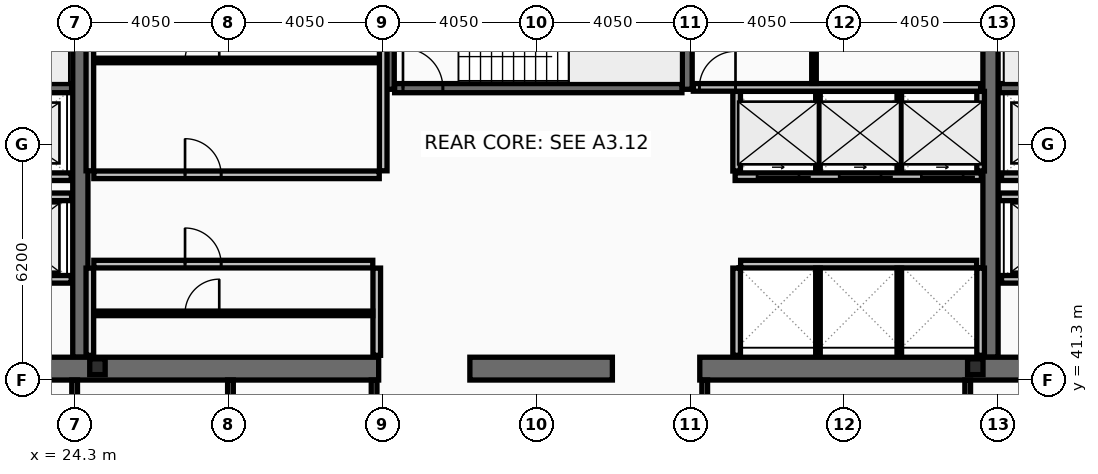
"""IFC4 building model, lengths in metres.
Left out: names, types, materials, properties, quantities, classifications, styles, units other than length and angle.
Written with IfcOpenShell. Run it as: python <this file> out.ifc"""

import sys

from ifc_helpers import new_model, si_unit, direction, frame, frame_2d, origin, origin_2d, place, context, subcontext, project, spatial, rectangle, i_section, extrude, element, fill, save


model = new_model("IFC4")
c1 = context("Model", 3, precision=1e-05, world=origin(), true_north=direction((0.0, 1.0)))
c2 = subcontext(c1, "Body", "Model", "MODEL_VIEW")
j1 = project(units=[si_unit("LENGTHUNIT", "METRE"), si_unit("PLANEANGLEUNIT", "RADIAN")], contexts=[c1])
p1 = place(None, origin())
s1 = spatial("IfcSite", under=j1, at=p1, CompositionType="ELEMENT")
p2 = place(p1, origin())
s2 = spatial("IfcBuilding", under=s1, at=p2, CompositionType="ELEMENT")
p3 = place(p2, frame((0.0, 0.0, 224.6)))
s3 = spatial("IfcBuildingStorey", under=s2, at=p3, CompositionType="ELEMENT", Elevation=224.6)
for number, where, z_axis, x_axis in (
    (1, (24.45, 41.9, 0.0), (0.0, 0.0, 1.0), (0.0, 1.0, 0.0)),
    (2, (48.4, 41.9, 0.0), (0.0, 0.0, 1.0), (0.0, 1.0, 0.0)),
):
    element("IfcWall", number, at=place(p3, frame(where, z_axis=z_axis, x_axis=x_axis)), inside=s3, PredefinedType="SHEAR", context=c2, shape_type="SweptSolid", body=[
        extrude(rectangle(XDim=11.2, YDim=0.4, at=frame_2d((5.6, 0.0))), origin(), (0.0, 0.0, 1.0), 3.44),
    ])
p4 = place(p3, frame((32.3, 41.6, 0.0), z_axis=(0.0, 0.0, 1.0), x_axis=(-1.0, 0.0, 0.0)))
e3 = element("IfcWall", 3, at=p4, inside=s3, PredefinedType="SHEAR", context=c2, shape_type="SweptSolid", body=[
    extrude(rectangle(XDim=11.45, YDim=0.6, at=frame_2d((5.725, 0.0))), origin(), (0.0, 0.0, 1.0), 3.44),
])
p5 = place(p3, frame((38.45, 41.6, 0.0), z_axis=(0.0, 0.0, 1.0), x_axis=(-1.0, 0.0, 0.0)))
e4 = element("IfcWall", 4, at=p5, inside=s3, PredefinedType="SHEAR", context=c2, shape_type="SweptSolid", body=[
    extrude(rectangle(XDim=3.75, YDim=0.6, at=frame_2d((1.875, 0.0))), origin(), (0.0, 0.0, 1.0), 3.44),
])
p6 = place(p3, frame((52.05, 41.6, 0.0), z_axis=(0.0, 0.0, 1.0), x_axis=(-1.0, 0.0, 0.0)))
e5 = element("IfcWall", 5, at=p6, inside=s3, PredefinedType="SHEAR", context=c2, shape_type="SweptSolid", body=[
    extrude(rectangle(XDim=11.3, YDim=0.6, at=frame_2d((5.65, 0.0))), origin(), (0.0, 0.0, 1.0), 3.44),
])
for number, where, z_axis, x_axis in (
    (6, (32.58, 48.95, 0.0), (0.0, 0.0, 1.0), (0.0, 1.0, 0.0)),
    (7, (40.42, 48.95, 0.0), (0.0, 0.0, 1.0), (0.0, 1.0, 0.0)),
):
    element("IfcWall", number, at=place(p3, frame(where, z_axis=z_axis, x_axis=x_axis)), inside=s3, PredefinedType="SHEAR", context=c2, shape_type="SweptSolid", body=[
        extrude(rectangle(XDim=4.15, YDim=0.26, at=frame_2d((2.075, 0.0))), origin(), (0.0, 0.0, 1.0), 3.44),
    ])
p7 = place(p3, frame((16.8, 48.98, 0.0), z_axis=(0.0, 0.0, 1.0), x_axis=(1.0, 0.0, 0.0)))
e8 = element("IfcWall", 8, at=p7, inside=s3, PredefinedType="SHEAR", context=c2, shape_type="SweptSolid", body=[
    extrude(rectangle(XDim=7.42, YDim=0.24, at=frame_2d((3.71, 0.0))), origin(), (0.0, 0.0, 1.0), 3.44),
])
p8 = place(p7, frame((0.22, 0.0, 0.0)))
e9 = element("IfcOpeningElement", 9, at=p8, cuts=e8, PredefinedType="OPENING", context=c2, shape_type="SweptSolid", body=[
    extrude(rectangle(XDim=1.05, YDim=2.15, at=frame_2d((0.525, 1.075))), frame((0.0, 0.13, 0.0), z_axis=(0.0, -1.0, 0.0), x_axis=(1.0, 0.0, 0.0)), (0.0, 0.0, 1.0), 0.26),
])
p9 = place(p3, frame((48.63, 48.98, 0.0), z_axis=(0.0, 0.0, 1.0), x_axis=(1.0, 0.0, 0.0)))
e10 = element("IfcWall", 10, at=p9, inside=s3, PredefinedType="SHEAR", context=c2, shape_type="SweptSolid", body=[
    extrude(rectangle(XDim=7.47, YDim=0.24, at=frame_2d((3.735, 0.0))), origin(), (0.0, 0.0, 1.0), 3.44),
])
p10 = place(p9, frame((6.2, 0.0, 0.0)))
e11 = element("IfcOpeningElement", 11, at=p10, cuts=e10, PredefinedType="OPENING", context=c2, shape_type="SweptSolid", body=[
    extrude(rectangle(XDim=1.05, YDim=2.15, at=frame_2d((0.525, 1.075))), frame((0.0, 0.13, 0.0), z_axis=(0.0, -1.0, 0.0), x_axis=(1.0, 0.0, 0.0)), (0.0, 0.0, 1.0), 0.26),
])
p11 = place(p3, frame((32.72, 48.98, 0.0), z_axis=(0.0, 0.0, 1.0), x_axis=(1.0, 0.0, 0.0)))
e12 = element("IfcWall", 12, at=p11, inside=s3, PredefinedType="SHEAR", context=c2, shape_type="SweptSolid", body=[
    extrude(rectangle(XDim=7.56, YDim=0.24, at=frame_2d((3.78, 0.0))), origin(), (0.0, 0.0, 1.0), 3.44),
])
p12 = place(p11, frame((0.22, 0.0, 0.0)))
e13 = element("IfcOpeningElement", 13, at=p12, cuts=e12, PredefinedType="OPENING", context=c2, shape_type="SweptSolid", body=[
    extrude(rectangle(XDim=1.05, YDim=2.15, at=frame_2d((0.525, 1.075))), frame((0.0, 0.13, 0.0), z_axis=(0.0, -1.0, 0.0), x_axis=(1.0, 0.0, 0.0)), (0.0, 0.0, 1.0), 0.26),
])
for number, where, z_axis, x_axis in (
    (14, (24.9, 41.65, 0.0), (0.0, 0.0, 1.0), (1.0, 0.0, 0.0)),
    (15, (48.0, 41.65, 0.0), (0.0, 0.0, 1.0), (1.0, 0.0, 0.0)),
):
    element("IfcColumn", number, at=place(p3, frame(where, z_axis=z_axis, x_axis=x_axis)), inside=s3, PredefinedType="COLUMN", context=c2, shape_type="SweptSolid", body=[
        extrude(i_section(OverallWidth=0.406, OverallDepth=0.416, WebThickness=0.03, FlangeThickness=0.048, at=origin_2d()), origin(), (0.0, 0.0, 1.0), 3.6),
    ])
p13 = place(p3, frame((51.61, 43.95, 0.0), z_axis=(0.0, 0.0, 1.0), x_axis=(-1.0, 0.0, 0.0)))
e16 = element("IfcWall", 16, at=p13, inside=s3, PredefinedType="PARTITIONING", context=c2, shape_type="SweptSolid", body=[
    extrude(rectangle(XDim=2.92, YDim=0.2, at=frame_2d((1.46, 0.0))), origin(), (0.0, 0.0, 1.0), 3.44),
])
p14 = place(p13, frame((0.81, 0.0, 0.0)))
e17 = element("IfcOpeningElement", 17, at=p14, cuts=e16, PredefinedType="OPENING", context=c2, shape_type="SweptSolid", body=[
    extrude(rectangle(XDim=1.3, YDim=2.18, at=frame_2d((0.65, 1.09))), frame((0.0, 0.11, 0.0), z_axis=(0.0, -1.0, 0.0), x_axis=(1.0, 0.0, 0.0)), (0.0, 0.0, 1.0), 0.22),
])
p15 = place(p3, frame((24.21, 43.95, 0.0), z_axis=(0.0, 0.0, 1.0), x_axis=(-1.0, 0.0, 0.0)))
e18 = element("IfcWall", 18, at=p15, inside=s3, PredefinedType="PARTITIONING", context=c2, shape_type="SweptSolid", body=[
    extrude(rectangle(XDim=2.97, YDim=0.2, at=frame_2d((1.485, 0.0))), origin(), (0.0, 0.0, 1.0), 3.44),
])
p16 = place(p15, frame((0.86, 0.0, 0.0)))
e19 = element("IfcOpeningElement", 19, at=p16, cuts=e18, PredefinedType="OPENING", context=c2, shape_type="SweptSolid", body=[
    extrude(rectangle(XDim=1.3, YDim=2.18, at=frame_2d((0.65, 1.09))), frame((0.0, 0.11, 0.0), z_axis=(0.0, -1.0, 0.0), x_axis=(1.0, 0.0, 0.0)), (0.0, 0.0, 1.0), 0.22),
])
p17 = place(p3, frame((51.61, 46.65, 0.0), z_axis=(0.0, 0.0, 1.0), x_axis=(-1.0, 0.0, 0.0)))
e20 = element("IfcWall", 20, at=p17, inside=s3, PredefinedType="PARTITIONING", context=c2, shape_type="SweptSolid", body=[
    extrude(rectangle(XDim=2.92, YDim=0.2, at=frame_2d((1.46, 0.0))), origin(), (0.0, 0.0, 1.0), 3.44),
])
p18 = place(p17, frame((0.86, 0.0, 0.0)))
e21 = element("IfcOpeningElement", 21, at=p18, cuts=e20, PredefinedType="OPENING", context=c2, shape_type="SweptSolid", body=[
    extrude(rectangle(XDim=1.2, YDim=2.18, at=frame_2d((0.6, 1.09))), frame((0.0, 0.11, 0.0), z_axis=(0.0, -1.0, 0.0), x_axis=(1.0, 0.0, 0.0)), (0.0, 0.0, 1.0), 0.22),
])
p19 = place(p3, frame((24.21, 46.65, 0.0), z_axis=(0.0, 0.0, 1.0), x_axis=(-1.0, 0.0, 0.0)))
e22 = element("IfcWall", 22, at=p19, inside=s3, PredefinedType="PARTITIONING", context=c2, shape_type="SweptSolid", body=[
    extrude(rectangle(XDim=2.97, YDim=0.2, at=frame_2d((1.485, 0.0))), origin(), (0.0, 0.0, 1.0), 3.44),
])
p20 = place(p19, frame((0.91, 0.0, 0.0)))
e23 = element("IfcOpeningElement", 23, at=p20, cuts=e22, PredefinedType="OPENING", context=c2, shape_type="SweptSolid", body=[
    extrude(rectangle(XDim=1.2, YDim=2.18, at=frame_2d((0.6, 1.09))), frame((0.0, 0.11, 0.0), z_axis=(0.0, -1.0, 0.0), x_axis=(1.0, 0.0, 0.0)), (0.0, 0.0, 1.0), 0.22),
])
p21 = place(p3, frame((48.16, 46.65, 0.0), z_axis=(0.0, 0.0, 1.0), x_axis=(-1.0, 0.0, 0.0)))
e24 = element("IfcWall", 24, at=p21, inside=s3, PredefinedType="PARTITIONING", context=c2, shape_type="SweptSolid", body=[
    extrude(rectangle(XDim=6.48, YDim=0.2, at=frame_2d((3.24, 0.0))), origin(), (0.0, 0.0, 1.0), 3.44),
])
p22 = place(p21, frame((4.8, 0.0, 0.0)))
e25 = element("IfcOpeningElement", 25, at=p22, cuts=e24, PredefinedType="OPENING", context=c2, shape_type="SweptSolid", body=[
    extrude(rectangle(XDim=1.1, YDim=2.18, at=frame_2d((0.55, 1.09))), frame((0.0, 0.11, 0.0), z_axis=(0.0, -1.0, 0.0), x_axis=(1.0, 0.0, 0.0)), (0.0, 0.0, 1.0), 0.22),
])
p23 = place(p21, frame((2.64, 0.0, 0.0)))
e26 = element("IfcOpeningElement", 26, at=p23, cuts=e24, PredefinedType="OPENING", context=c2, shape_type="SweptSolid", body=[
    extrude(rectangle(XDim=1.1, YDim=2.18, at=frame_2d((0.55, 1.09))), frame((0.0, 0.11, 0.0), z_axis=(0.0, -1.0, 0.0), x_axis=(1.0, 0.0, 0.0)), (0.0, 0.0, 1.0), 0.22),
])
p24 = place(p21, frame((0.48, 0.0, 0.0)))
e27 = element("IfcOpeningElement", 27, at=p24, cuts=e24, PredefinedType="OPENING", context=c2, shape_type="SweptSolid", body=[
    extrude(rectangle(XDim=1.1, YDim=2.18, at=frame_2d((0.55, 1.09))), frame((0.0, 0.11, 0.0), z_axis=(0.0, -1.0, 0.0), x_axis=(1.0, 0.0, 0.0)), (0.0, 0.0, 1.0), 0.22),
])
p25 = place(p3, frame((21.2, 46.12, 0.0), z_axis=(0.0, 0.0, 1.0), x_axis=(1.0, 0.0, 0.0)))
e28 = element("IfcWall", 28, at=p25, inside=s3, PredefinedType="PARTITIONING", context=c2, shape_type="SweptSolid", body=[
    extrude(rectangle(XDim=3.02, YDim=0.2, at=frame_2d((1.51, 0.0))), origin(), (0.0, 0.0, 1.0), 3.44),
])
p26 = place(p3, frame((48.63, 46.12, 0.0), z_axis=(0.0, 0.0, 1.0), x_axis=(1.0, 0.0, 0.0)))
e29 = element("IfcWall", 29, at=p26, inside=s3, PredefinedType="PARTITIONING", context=c2, shape_type="SweptSolid", body=[
    extrude(rectangle(XDim=3.07, YDim=0.2, at=frame_2d((1.535, 0.0))), origin(), (0.0, 0.0, 1.0), 3.44),
])
for number, where, z_axis, x_axis in (
    (30, (24.7, 46.805, 0.0), (0.0, 0.0, 1.0), (0.0, 1.0, 0.0)),
    (31, (32.42, 46.805, 0.0), (0.0, 0.0, 1.0), (0.0, 1.0, 0.0)),
):
    element("IfcWall", number, at=place(p3, frame(where, z_axis=z_axis, x_axis=x_axis)), inside=s3, PredefinedType="PARTITIONING", context=c2, shape_type="SweptSolid", body=[
        extrude(rectangle(XDim=5.99, YDim=0.2, at=frame_2d((2.995, 0.0))), origin(), (0.0, 0.0, 1.0), 3.44),
    ])
p27 = place(p3, frame((24.805, 49.709, 0.0), z_axis=(0.0, 0.0, 1.0), x_axis=(1.0, 0.0, 0.0)))
e32 = element("IfcWall", 32, at=p27, inside=s3, PredefinedType="PARTITIONING", context=c2, shape_type="SweptSolid", body=[
    extrude(rectangle(XDim=7.51, YDim=0.12, at=frame_2d((3.755, 0.0))), origin(), (0.0, 0.0, 1.0), 3.44),
])
p28 = place(p27, frame((2.4, 0.0, 0.0)))
e33 = element("IfcOpeningElement", 33, at=p28, cuts=e32, PredefinedType="OPENING", context=c2, shape_type="SweptSolid", body=[
    extrude(rectangle(XDim=0.9, YDim=2.05, at=frame_2d((0.45, 1.025))), frame((0.0, 0.07, 0.0), z_axis=(0.0, -1.0, 0.0), x_axis=(1.0, 0.0, 0.0)), (0.0, 0.0, 1.0), 0.14),
])
p29 = place(p3, frame((24.805, 46.7, 0.0), z_axis=(0.0, 0.0, 1.0), x_axis=(1.0, 0.0, 0.0)))
e34 = element("IfcWall", 34, at=p29, inside=s3, PredefinedType="PARTITIONING", context=c2, shape_type="SweptSolid", body=[
    extrude(rectangle(XDim=7.51, YDim=0.2, at=frame_2d((3.755, 0.0))), origin(), (0.0, 0.0, 1.0), 3.44),
])
p30 = place(p29, frame((2.4, 0.0, 0.0)))
e35 = element("IfcOpeningElement", 35, at=p30, cuts=e34, PredefinedType="OPENING", context=c2, shape_type="SweptSolid", body=[
    extrude(rectangle(XDim=0.95, YDim=2.1, at=frame_2d((0.475, 1.05))), frame((0.0, 0.11, 0.0), z_axis=(0.0, -1.0, 0.0), x_axis=(1.0, 0.0, 0.0)), (0.0, 0.0, 1.0), 0.22),
])
for number, where, z_axis, x_axis in (
    (36, (24.7, 41.95, 0.0), (0.0, 0.0, 1.0), (0.0, 1.0, 0.0)),
    (37, (32.25, 41.95, 0.0), (0.0, 0.0, 1.0), (0.0, 1.0, 0.0)),
):
    element("IfcWall", number, at=place(p3, frame(where, z_axis=z_axis, x_axis=x_axis)), inside=s3, PredefinedType="PARTITIONING", context=c2, shape_type="SweptSolid", body=[
        extrude(rectangle(XDim=2.295, YDim=0.2, at=frame_2d((1.147, 0.0))), origin(), (0.0, 0.0, 1.0), 3.44),
    ])
p31 = place(p3, frame((24.805, 43.054, 0.0), z_axis=(0.0, 0.0, 1.0), x_axis=(1.0, 0.0, 0.0)))
e38 = element("IfcWall", 38, at=p31, inside=s3, PredefinedType="PARTITIONING", context=c2, shape_type="SweptSolid", body=[
    extrude(rectangle(XDim=7.34, YDim=0.12, at=frame_2d((3.67, 0.0))), origin(), (0.0, 0.0, 1.0), 3.44),
])
p32 = place(p31, frame((2.4, 0.0, 0.0)))
e39 = element("IfcOpeningElement", 39, at=p32, cuts=e38, PredefinedType="OPENING", context=c2, shape_type="SweptSolid", body=[
    extrude(rectangle(XDim=0.9, YDim=2.05, at=frame_2d((0.45, 1.025))), frame((0.0, 0.07, 0.0), z_axis=(0.0, -1.0, 0.0), x_axis=(1.0, 0.0, 0.0)), (0.0, 0.0, 1.0), 0.14),
])
p33 = place(p3, frame((24.805, 44.35, 0.0), z_axis=(0.0, 0.0, 1.0), x_axis=(1.0, 0.0, 0.0)))
e40 = element("IfcWall", 40, at=p33, inside=s3, PredefinedType="PARTITIONING", context=c2, shape_type="SweptSolid", body=[
    extrude(rectangle(XDim=7.34, YDim=0.2, at=frame_2d((3.67, 0.0))), origin(), (0.0, 0.0, 1.0), 3.44),
])
p34 = place(p33, frame((2.4, 0.0, 0.0)))
e41 = element("IfcOpeningElement", 41, at=p34, cuts=e40, PredefinedType="OPENING", context=c2, shape_type="SweptSolid", body=[
    extrude(rectangle(XDim=0.95, YDim=2.1, at=frame_2d((0.475, 1.05))), frame((0.0, 0.11, 0.0), z_axis=(0.0, -1.0, 0.0), x_axis=(1.0, 0.0, 0.0)), (0.0, 0.0, 1.0), 0.22),
])
for number, where, z_axis, x_axis in (
    (42, (41.72, 46.8, 0.0), (0.0, 0.0, 1.0), (0.0, 1.0, 0.0)),
    (43, (48.14, 46.8, 0.0), (0.0, 0.0, 1.0), (0.0, 1.0, 0.0)),
):
    element("IfcWall", number, at=place(p3, frame(where, z_axis=z_axis, x_axis=x_axis)), inside=s3, PredefinedType="PARTITIONING", context=c2, shape_type="SweptSolid", body=[
        extrude(rectangle(XDim=2.095, YDim=0.2, at=frame_2d((1.047, 0.0))), origin(), (0.0, 0.0, 1.0), 3.44),
    ])
for number, where, z_axis, x_axis in (
    (44, (43.86, 46.8, 0.0), (0.0, 0.0, 1.0), (0.0, 1.0, 0.0)),
    (45, (46.0, 46.8, 0.0), (0.0, 0.0, 1.0), (0.0, 1.0, 0.0)),
):
    element("IfcWall", number, at=place(p3, frame(where, z_axis=z_axis, x_axis=x_axis)), inside=s3, PredefinedType="PARTITIONING", context=c2, shape_type="SweptSolid", body=[
        extrude(rectangle(XDim=2.095, YDim=0.12, at=frame_2d((1.047, 0.0))), origin(), (0.0, 0.0, 1.0), 3.44),
    ])
p35 = place(p3, frame((41.825, 44.35, 0.0), z_axis=(0.0, 0.0, 1.0), x_axis=(1.0, 0.0, 0.0)))
e46 = element("IfcWall", 46, at=p35, inside=s3, PredefinedType="PARTITIONING", context=c2, shape_type="SweptSolid", body=[
    extrude(rectangle(XDim=6.21, YDim=0.2, at=frame_2d((3.105, 0.0))), origin(), (0.0, 0.0, 1.0), 3.44),
])
for number, where, z_axis, x_axis in (
    (47, (41.72, 41.95, 0.0), (0.0, 0.0, 1.0), (0.0, 1.0, 0.0)),
    (48, (48.14, 41.95, 0.0), (0.0, 0.0, 1.0), (0.0, 1.0, 0.0)),
):
    element("IfcWall", number, at=place(p3, frame(where, z_axis=z_axis, x_axis=x_axis)), inside=s3, PredefinedType="PARTITIONING", context=c2, shape_type="SweptSolid", body=[
        extrude(rectangle(XDim=2.295, YDim=0.2, at=frame_2d((1.147, 0.0))), origin(), (0.0, 0.0, 1.0), 3.44),
    ])
for number, where, z_axis, x_axis in (
    (49, (43.86, 41.95, 0.0), (0.0, 0.0, 1.0), (0.0, 1.0, 0.0)),
    (50, (46.0, 41.95, 0.0), (0.0, 0.0, 1.0), (0.0, 1.0, 0.0)),
):
    element("IfcWall", number, at=place(p3, frame(where, z_axis=z_axis, x_axis=x_axis)), inside=s3, PredefinedType="PARTITIONING", context=c2, shape_type="SweptSolid", body=[
        extrude(rectangle(XDim=2.295, YDim=0.12, at=frame_2d((1.147, 0.0))), origin(), (0.0, 0.0, 1.0), 3.44),
    ])
p36 = place(p3, frame((40.58, 49.0, 0.0), z_axis=(0.0, 0.0, 1.0), x_axis=(1.0, 0.0, 0.0)))
e51 = element("IfcWall", 51, at=p36, inside=s3, PredefinedType="PARTITIONING", context=c2, shape_type="SweptSolid", body=[
    extrude(rectangle(XDim=7.56, YDim=0.2, at=frame_2d((3.78, 0.0))), origin(), (0.0, 0.0, 1.0), 3.44),
])
p37 = place(p36, frame((0.16, 0.0, 0.0)))
e52 = element("IfcOpeningElement", 52, at=p37, cuts=e51, PredefinedType="OPENING", context=c2, shape_type="SweptSolid", body=[
    extrude(rectangle(XDim=0.95, YDim=2.1, at=frame_2d((0.475, 1.05))), frame((0.0, 0.11, 0.0), z_axis=(0.0, -1.0, 0.0), x_axis=(1.0, 0.0, 0.0)), (0.0, 0.0, 1.0), 0.22),
])
p38 = place(p3, frame((43.755, 49.105, 0.0), z_axis=(0.0, 0.0, 1.0), x_axis=(0.0, 1.0, 0.0)))
e53 = element("IfcWall", 53, at=p38, inside=s3, PredefinedType="PARTITIONING", context=c2, shape_type="SweptSolid", body=[
    extrude(rectangle(XDim=3.69, YDim=0.12, at=frame_2d((1.845, 0.0))), origin(), (0.0, 0.0, 1.0), 3.44),
])
p39 = place(p38, frame((1.05, 0.0, 0.0)))
e54 = element("IfcOpeningElement", 54, at=p39, cuts=e53, PredefinedType="OPENING", context=c2, shape_type="SweptSolid", body=[
    extrude(rectangle(XDim=0.9, YDim=2.05, at=frame_2d((0.45, 1.025))), frame((0.0, 0.07, 0.0), z_axis=(0.0, -1.0, 0.0), x_axis=(1.0, 0.0, 0.0)), (0.0, 0.0, 1.0), 0.14),
])
for number, where, z_axis, x_axis in (
    (55, (24.3, 38.28, 0.0), (0.0, 0.0, 1.0), (0.0, 1.0, 0.0)),
    (56, (28.4, 38.28, 0.0), (0.0, 0.0, 1.0), (0.0, 1.0, 0.0)),
    (57, (32.18, 38.28, 0.0), (0.0, 0.0, 1.0), (0.0, 1.0, 0.0)),
    (58, (40.88, 38.28, 0.0), (0.0, 0.0, 1.0), (0.0, 1.0, 0.0)),
):
    element("IfcWall", number, at=place(p3, frame(where, z_axis=z_axis, x_axis=x_axis)), inside=s3, PredefinedType="PARTITIONING", context=c2, shape_type="SweptSolid", body=[
        extrude(rectangle(XDim=3.02, YDim=0.15, at=frame_2d((1.51, 0.0))), origin(), (0.0, 0.0, 1.0), 3.44),
    ])
p40 = place(p3, frame((47.8, 38.28, 0.0), z_axis=(0.0, 0.0, 1.0), x_axis=(0.0, 1.0, 0.0)))
e59 = element("IfcWall", 59, at=p40, inside=s3, PredefinedType="PARTITIONING", context=c2, shape_type="SweptSolid", body=[
    extrude(rectangle(XDim=3.02, YDim=0.15, at=frame_2d((1.51, 0.0))), origin(), (0.0, 0.0, 1.0), 2.78),
])
p41 = place(p12, origin())
e60 = element("IfcDoor", 60, at=p41, inside=s3, OperationType="SINGLE_SWING_LEFT", PredefinedType="DOOR", context=c2, shape_type="SweptSolid", body=[
    extrude(rectangle(XDim=1.05, YDim=2.15, at=frame_2d((0.525, 1.075))), frame((0.0, 0.025, 0.0), z_axis=(0.0, -1.0, 0.0), x_axis=(1.0, 0.0, 0.0)), (0.0, 0.0, 1.0), 0.05),
])
fill(e13, e60)
p42 = place(p22, origin())
e61 = element("IfcDoor", 61, at=p42, inside=s3, OperationType="SLIDING_TO_LEFT", PredefinedType="DOOR", context=c2, shape_type="SweptSolid", body=[
    extrude(rectangle(XDim=1.1, YDim=2.18, at=frame_2d((0.55, 1.09))), frame((0.0, 0.025, 0.0), z_axis=(0.0, -1.0, 0.0), x_axis=(1.0, 0.0, 0.0)), (0.0, 0.0, 1.0), 0.05),
])
fill(e25, e61)
p43 = place(p23, origin())
e62 = element("IfcDoor", 62, at=p43, inside=s3, OperationType="SLIDING_TO_LEFT", PredefinedType="DOOR", context=c2, shape_type="SweptSolid", body=[
    extrude(rectangle(XDim=1.1, YDim=2.18, at=frame_2d((0.55, 1.09))), frame((0.0, 0.025, 0.0), z_axis=(0.0, -1.0, 0.0), x_axis=(1.0, 0.0, 0.0)), (0.0, 0.0, 1.0), 0.05),
])
fill(e26, e62)
p44 = place(p24, origin())
e63 = element("IfcDoor", 63, at=p44, inside=s3, OperationType="SLIDING_TO_LEFT", PredefinedType="DOOR", context=c2, shape_type="SweptSolid", body=[
    extrude(rectangle(XDim=1.1, YDim=2.18, at=frame_2d((0.55, 1.09))), frame((0.0, 0.025, 0.0), z_axis=(0.0, -1.0, 0.0), x_axis=(1.0, 0.0, 0.0)), (0.0, 0.0, 1.0), 0.05),
])
fill(e27, e63)
p45 = place(p28, origin())
e64 = element("IfcDoor", 64, at=p45, inside=s3, OperationType="SINGLE_SWING_RIGHT", PredefinedType="DOOR", context=c2, shape_type="SweptSolid", body=[
    extrude(rectangle(XDim=0.9, YDim=2.05, at=frame_2d((0.45, 1.025))), frame((0.0, 0.025, 0.0), z_axis=(0.0, -1.0, 0.0), x_axis=(1.0, 0.0, 0.0)), (0.0, 0.0, 1.0), 0.05),
])
fill(e33, e64)
p46 = place(p30, origin())
e65 = element("IfcDoor", 65, at=p46, inside=s3, OperationType="SINGLE_SWING_LEFT", PredefinedType="DOOR", context=c2, shape_type="SweptSolid", body=[
    extrude(rectangle(XDim=0.95, YDim=2.1, at=frame_2d((0.475, 1.05))), frame((0.0, 0.025, 0.0), z_axis=(0.0, -1.0, 0.0), x_axis=(1.0, 0.0, 0.0)), (0.0, 0.0, 1.0), 0.05),
])
fill(e35, e65)
p47 = place(p32, origin())
e66 = element("IfcDoor", 66, at=p47, inside=s3, OperationType="SINGLE_SWING_RIGHT", PredefinedType="DOOR", context=c2, shape_type="SweptSolid", body=[
    extrude(rectangle(XDim=0.9, YDim=2.05, at=frame_2d((0.45, 1.025))), frame((0.0, 0.025, 0.0), z_axis=(0.0, -1.0, 0.0), x_axis=(1.0, 0.0, 0.0)), (0.0, 0.0, 1.0), 0.05),
])
fill(e39, e66)
p48 = place(p34, origin())
e67 = element("IfcDoor", 67, at=p48, inside=s3, OperationType="SINGLE_SWING_LEFT", PredefinedType="DOOR", context=c2, shape_type="SweptSolid", body=[
    extrude(rectangle(XDim=0.95, YDim=2.1, at=frame_2d((0.475, 1.05))), frame((0.0, 0.025, 0.0), z_axis=(0.0, -1.0, 0.0), x_axis=(1.0, 0.0, 0.0)), (0.0, 0.0, 1.0), 0.05),
])
fill(e41, e67)
p49 = place(p37, origin())
e68 = element("IfcDoor", 68, at=p49, inside=s3, OperationType="SINGLE_SWING_RIGHT", PredefinedType="DOOR", context=c2, shape_type="SweptSolid", body=[
    extrude(rectangle(XDim=0.95, YDim=2.1, at=frame_2d((0.475, 1.05))), frame((0.0, 0.025, 0.0), z_axis=(0.0, -1.0, 0.0), x_axis=(1.0, 0.0, 0.0)), (0.0, 0.0, 1.0), 0.05),
])
fill(e52, e68)
save(model, sys.argv[1])
